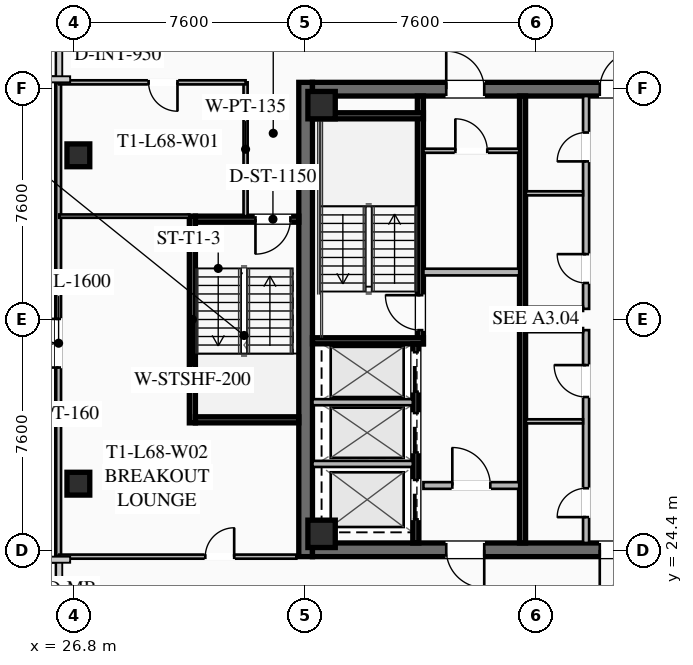
"""IFC4 building model, lengths in metres.
Left out: names, types, materials, properties, quantities, classifications, styles, units other than length and angle.
Written with IfcOpenShell. Run it as: python <this file> out.ifc"""

import sys

from ifc_helpers import new_model, si_unit, direction, frame, frame_2d, origin, origin_2d, place, context, subcontext, project, spatial, rectangle, hollow_rectangle, extrude, element, fill, save


model = new_model("IFC4")
c1 = context("Model", 3, precision=1e-05, world=origin(), true_north=direction((0.0, 1.0)))
c2 = subcontext(c1, "Body", "Model", "MODEL_VIEW")
j1 = project(units=[si_unit("LENGTHUNIT", "METRE"), si_unit("PLANEANGLEUNIT", "RADIAN")], contexts=[c1])
p1 = place(None, origin())
s1 = spatial("IfcSite", under=j1, at=p1, CompositionType="ELEMENT")
p2 = place(p1, origin())
s2 = spatial("IfcBuilding", under=s1, at=p2, CompositionType="ELEMENT")
p3 = place(p2, frame((0.0, 0.0, 251.4)))
s3 = spatial("IfcBuildingStorey", under=s2, at=p3, CompositionType="ELEMENT", Elevation=251.4)
p4 = place(p3, frame((34.425, 24.2, 0.0), z_axis=(0.0, 0.0, 1.0), x_axis=(0.0, 1.0, 0.0)))
e1 = element("IfcWall", 1, at=p4, inside=s3, PredefinedType="SHEAR", context=c2, shape_type="SweptSolid", body=[
    extrude(rectangle(XDim=15.6, YDim=0.45, at=frame_2d((7.8, 0.0))), origin(), (0.0, 0.0, 1.0), 4.0),
])
p5 = place(p3, frame((49.35, 24.425, 0.0), z_axis=(0.0, 0.0, 1.0), x_axis=(-1.0, 0.0, 0.0)))
e2 = element("IfcWall", 2, at=p5, inside=s3, PredefinedType="SHEAR", context=c2, shape_type="SweptSolid", body=[
    extrude(rectangle(XDim=14.7, YDim=0.45, at=frame_2d((7.35, 0.0))), origin(), (0.0, 0.0, 1.0), 4.0),
])
p6 = place(p5, frame((9.05, 0.0, 0.0)))
e3 = element("IfcOpeningElement", 3, at=p6, cuts=e2, PredefinedType="OPENING", context=c2, shape_type="SweptSolid", body=[
    extrude(rectangle(XDim=1.25, YDim=2.25, at=frame_2d((0.625, 1.125))), frame((0.0, 0.235, 0.0), z_axis=(0.0, -1.0, 0.0), x_axis=(1.0, 0.0, 0.0)), (0.0, 0.0, 1.0), 0.47),
])
p7 = place(p5, frame((4.0, 0.0, 0.0)))
e4 = element("IfcOpeningElement", 4, at=p7, cuts=e2, PredefinedType="OPENING", context=c2, shape_type="SweptSolid", body=[
    extrude(rectangle(XDim=1.25, YDim=2.25, at=frame_2d((0.625, 1.125))), frame((0.0, 0.235, 0.0), z_axis=(0.0, -1.0, 0.0), x_axis=(1.0, 0.0, 0.0)), (0.0, 0.0, 1.0), 0.47),
])
p8 = place(p3, frame((34.65, 39.575, 0.0), z_axis=(0.0, 0.0, 1.0), x_axis=(1.0, 0.0, 0.0)))
e5 = element("IfcWall", 5, at=p8, inside=s3, PredefinedType="SHEAR", context=c2, shape_type="SweptSolid", body=[
    extrude(rectangle(XDim=14.7, YDim=0.45, at=frame_2d((7.35, 0.0))), origin(), (0.0, 0.0, 1.0), 4.0),
])
p9 = place(p8, frame((4.4, 0.0, 0.0)))
e6 = element("IfcOpeningElement", 6, at=p9, cuts=e5, PredefinedType="OPENING", context=c2, shape_type="SweptSolid", body=[
    extrude(rectangle(XDim=1.25, YDim=2.25, at=frame_2d((0.625, 1.125))), frame((0.0, 0.235, 0.0), z_axis=(0.0, -1.0, 0.0), x_axis=(1.0, 0.0, 0.0)), (0.0, 0.0, 1.0), 0.47),
])
p10 = place(p8, frame((9.45, 0.0, 0.0)))
e7 = element("IfcOpeningElement", 7, at=p10, cuts=e5, PredefinedType="OPENING", context=c2, shape_type="SweptSolid", body=[
    extrude(rectangle(XDim=1.25, YDim=2.25, at=frame_2d((0.625, 1.125))), frame((0.0, 0.235, 0.0), z_axis=(0.0, -1.0, 0.0), x_axis=(1.0, 0.0, 0.0)), (0.0, 0.0, 1.0), 0.47),
])
for number, where, z_axis, x_axis in (
    (8, (34.95, 24.95, 0.0), (0.0, 0.0, 1.0), (1.0, 0.0, 0.0)),
    (9, (34.95, 39.05, 0.0), (0.0, 0.0, 1.0), (1.0, 0.0, 0.0)),
):
    element("IfcColumn", number, at=place(p3, frame(where, z_axis=z_axis, x_axis=x_axis)), inside=s3, PredefinedType="COLUMN", context=c2, shape_type="SweptSolid", body=[
        extrude(hollow_rectangle(XDim=0.9, YDim=0.9, WallThickness=0.04, at=origin_2d()), origin(), (0.0, 0.0, 1.0), 3.78),
    ])
for number, where, z_axis, x_axis in (
    (10, (26.95, 37.4, 0.0), (0.0, 0.0, 1.0), (1.0, 0.0, 0.0)),
    (11, (26.95, 26.6, 0.0), (0.0, 0.0, 1.0), (1.0, 0.0, 0.0)),
):
    element("IfcColumn", number, at=place(p3, frame(where, z_axis=z_axis, x_axis=x_axis)), inside=s3, PredefinedType="COLUMN", context=c2, shape_type="SweptSolid", body=[
        extrude(hollow_rectangle(XDim=0.75, YDim=0.75, WallThickness=0.032, at=origin_2d()), origin(), (0.0, 0.0, 1.0), 3.78),
    ])
p11 = place(p3, frame((26.3, 24.22, 0.0), z_axis=(0.0, 0.0, 1.0), x_axis=(0.0, 1.0, 0.0)))
e12 = element("IfcWall", 12, at=p11, inside=s3, PredefinedType="PARTITIONING", context=c2, shape_type="SweptSolid", body=[
    extrude(rectangle(XDim=15.56, YDim=0.16, at=frame_2d((7.78, 0.0))), origin(), (0.0, 0.0, 1.0), 2.971),
])
p12 = place(p11, frame((6.2, 0.0, 0.0)))
e13 = element("IfcOpeningElement", 13, at=p12, cuts=e12, PredefinedType="OPENING", context=c2, shape_type="SweptSolid", body=[
    extrude(rectangle(XDim=1.6, YDim=2.25, at=frame_2d((0.8, 1.125))), frame((0.0, 0.09, 0.0), z_axis=(0.0, -1.0, 0.0), x_axis=(1.0, 0.0, 0.0)), (0.0, 0.0, 1.0), 0.18),
])
p13 = place(p3, frame((38.2, 31.2, 0.0), z_axis=(0.0, 0.0, 1.0), x_axis=(0.0, 1.0, 0.0)))
e14 = element("IfcWall", 14, at=p13, inside=s3, PredefinedType="SHEAR", context=c2, shape_type="SweptSolid", body=[
    extrude(rectangle(XDim=8.15, YDim=0.2, at=frame_2d((4.075, 0.0))), origin(), (0.0, 0.0, 1.0), 3.78),
])
p14 = place(p13, frame((0.45, 0.0, 0.0)))
e15 = element("IfcOpeningElement", 15, at=p14, cuts=e14, PredefinedType="OPENING", context=c2, shape_type="SweptSolid", body=[
    extrude(rectangle(XDim=1.15, YDim=2.2, at=frame_2d((0.575, 1.1))), frame((0.0, 0.11, 0.0), z_axis=(0.0, -1.0, 0.0), x_axis=(1.0, 0.0, 0.0)), (0.0, 0.0, 1.0), 0.22),
])
for number, where, z_axis, x_axis in (
    (16, (34.65, 31.3, 0.0), (0.0, 0.0, 1.0), (1.0, 0.0, 0.0)),
    (17, (34.65, 38.7, 0.0), (0.0, 0.0, 1.0), (1.0, 0.0, 0.0)),
):
    element("IfcWall", number, at=place(p3, frame(where, z_axis=z_axis, x_axis=x_axis)), inside=s3, PredefinedType="SHEAR", context=c2, shape_type="SweptSolid", body=[
        extrude(rectangle(XDim=3.65, YDim=0.2, at=frame_2d((1.825, 0.0))), origin(), (0.0, 0.0, 1.0), 3.78),
    ])
p15 = place(p3, frame((41.56, 24.65, 0.0), z_axis=(0.0, 0.0, 1.0), x_axis=(0.0, 1.0, 0.0)))
e18 = element("IfcWall", 18, at=p15, inside=s3, PredefinedType="SHEAR", context=c2, shape_type="SweptSolid", body=[
    extrude(rectangle(XDim=14.7, YDim=0.2, at=frame_2d((7.35, 0.0))), origin(), (0.0, 0.0, 1.0), 3.78),
])
p16 = place(p3, frame((38.3, 33.56, 0.0), z_axis=(0.0, 0.0, 1.0), x_axis=(1.0, 0.0, 0.0)))
e19 = element("IfcWall", 19, at=p16, inside=s3, PredefinedType="SOLIDWALL", context=c2, shape_type="SweptSolid", body=[
    extrude(rectangle(XDim=3.15, YDim=0.22, at=frame_2d((1.575, 0.0))), origin(), (0.0, 0.0, 1.0), 2.971),
])
p17 = place(p3, frame((38.3, 26.54, 0.0), z_axis=(0.0, 0.0, 1.0), x_axis=(1.0, 0.0, 0.0)))
e20 = element("IfcWall", 20, at=p17, inside=s3, PredefinedType="SOLIDWALL", context=c2, shape_type="SweptSolid", body=[
    extrude(rectangle(XDim=3.15, YDim=0.22, at=frame_2d((1.575, 0.0))), origin(), (0.0, 0.0, 1.0), 2.971),
])
p18 = place(p17, frame((0.95, 0.0, 0.0)))
e21 = element("IfcOpeningElement", 21, at=p18, cuts=e20, PredefinedType="OPENING", context=c2, shape_type="SweptSolid", body=[
    extrude(rectangle(XDim=1.25, YDim=2.25, at=frame_2d((0.625, 1.125))), frame((0.0, 0.12, 0.0), z_axis=(0.0, -1.0, 0.0), x_axis=(1.0, 0.0, 0.0)), (0.0, 0.0, 1.0), 0.24),
])
p19 = place(p3, frame((38.05, 24.65, 0.0), z_axis=(0.0, 0.0, 1.0), x_axis=(0.0, 1.0, 0.0)))
e22 = element("IfcWall", 22, at=p19, inside=s3, PredefinedType="SHEAR", context=c2, shape_type="SweptSolid", body=[
    extrude(rectangle(XDim=6.55, YDim=0.2, at=frame_2d((3.275, 0.0))), origin(), (0.0, 0.0, 1.0), 3.78),
])
p20 = place(p19, frame((4.975, 0.0, 0.0)))
e23 = element("IfcOpeningElement", 23, at=p20, cuts=e22, PredefinedType="OPENING", context=c2, shape_type="SweptSolid", body=[
    extrude(rectangle(XDim=1.3, YDim=2.25, at=frame_2d((0.65, 1.125))), frame((0.0, 0.11, 0.0), z_axis=(0.0, -1.0, 0.0), x_axis=(1.0, 0.0, 0.0)), (0.0, 0.0, 1.0), 0.22),
])
p21 = place(p19, frame((2.975, 0.0, 0.0)))
e24 = element("IfcOpeningElement", 24, at=p21, cuts=e22, PredefinedType="OPENING", context=c2, shape_type="SweptSolid", body=[
    extrude(rectangle(XDim=1.3, YDim=2.25, at=frame_2d((0.65, 1.125))), frame((0.0, 0.11, 0.0), z_axis=(0.0, -1.0, 0.0), x_axis=(1.0, 0.0, 0.0)), (0.0, 0.0, 1.0), 0.22),
])
p22 = place(p19, frame((0.775, 0.0, 0.0)))
e25 = element("IfcOpeningElement", 25, at=p22, cuts=e22, PredefinedType="OPENING", context=c2, shape_type="SweptSolid", body=[
    extrude(rectangle(XDim=1.3, YDim=2.25, at=frame_2d((0.65, 1.125))), frame((0.0, 0.11, 0.0), z_axis=(0.0, -1.0, 0.0), x_axis=(1.0, 0.0, 0.0)), (0.0, 0.0, 1.0), 0.22),
])
for number, where, z_axis, x_axis in (
    (26, (34.65, 27.25, 0.0), (0.0, 0.0, 1.0), (1.0, 0.0, 0.0)),
    (27, (34.65, 29.28, 0.0), (0.0, 0.0, 1.0), (1.0, 0.0, 0.0)),
):
    element("IfcWall", number, at=place(p3, frame(where, z_axis=z_axis, x_axis=x_axis)), inside=s3, PredefinedType="SOLIDWALL", context=c2, shape_type="SweptSolid", body=[
        extrude(rectangle(XDim=3.3, YDim=0.2, at=frame_2d((1.65, 0.0))), origin(), (0.0, 0.0, 1.0), 3.78),
    ])
p23 = place(p3, frame((38.3, 37.55, 0.0), z_axis=(0.0, 0.0, 1.0), x_axis=(1.0, 0.0, 0.0)))
e28 = element("IfcWall", 28, at=p23, inside=s3, PredefinedType="PARTITIONING", context=c2, shape_type="SweptSolid", body=[
    extrude(rectangle(XDim=3.15, YDim=0.135, at=frame_2d((1.575, 0.0))), origin(), (0.0, 0.0, 1.0), 2.971),
])
p24 = place(p23, frame((1.05, 0.0, 0.0)))
e29 = element("IfcOpeningElement", 29, at=p24, cuts=e28, PredefinedType="OPENING", context=c2, shape_type="SweptSolid", body=[
    extrude(rectangle(XDim=1.05, YDim=2.2, at=frame_2d((0.525, 1.1))), frame((0.0, 0.077, 0.0), z_axis=(0.0, -1.0, 0.0), x_axis=(1.0, 0.0, 0.0)), (0.0, 0.0, 1.0), 0.155),
])
p25 = place(p3, frame((43.65, 24.65, 0.0), z_axis=(0.0, 0.0, 1.0), x_axis=(0.0, 1.0, 0.0)))
e30 = element("IfcWall", 30, at=p25, inside=s3, PredefinedType="SOLIDWALL", context=c2, shape_type="SweptSolid", body=[
    extrude(rectangle(XDim=7.0, YDim=0.2, at=frame_2d((3.5, 0.0))), origin(), (0.0, 0.0, 1.0), 2.971),
])
p26 = place(p25, frame((0.85, 0.0, 0.0)))
e31 = element("IfcOpeningElement", 31, at=p26, cuts=e30, PredefinedType="OPENING", context=c2, shape_type="SweptSolid", body=[
    extrude(rectangle(XDim=0.95, YDim=2.05, at=frame_2d((0.475, 1.025))), frame((0.0, 0.11, 0.0), z_axis=(0.0, -1.0, 0.0), x_axis=(1.0, 0.0, 0.0)), (0.0, 0.0, 1.0), 0.22),
])
p27 = place(p25, frame((4.8, 0.0, 0.0)))
e32 = element("IfcOpeningElement", 32, at=p27, cuts=e30, PredefinedType="OPENING", context=c2, shape_type="SweptSolid", body=[
    extrude(rectangle(XDim=1.05, YDim=2.2, at=frame_2d((0.525, 1.1))), frame((0.0, 0.11, 0.0), z_axis=(0.0, -1.0, 0.0), x_axis=(1.0, 0.0, 0.0)), (0.0, 0.0, 1.0), 0.22),
])
for number, where, z_axis, x_axis in (
    (33, (41.67, 31.65, 0.0), (0.0, 0.0, 1.0), (1.0, 0.0, 0.0)),
    (34, (41.67, 28.65, 0.0), (0.0, 0.0, 1.0), (1.0, 0.0, 0.0)),
):
    element("IfcWall", number, at=place(p3, frame(where, z_axis=z_axis, x_axis=x_axis)), inside=s3, PredefinedType="PARTITIONING", context=c2, shape_type="SweptSolid", body=[
        extrude(rectangle(XDim=1.88, YDim=0.135, at=frame_2d((0.94, 0.0))), origin(), (0.0, 0.0, 1.0), 2.971),
    ])
p28 = place(p3, frame((43.65, 32.35, 0.0), z_axis=(0.0, 0.0, 1.0), x_axis=(0.0, 1.0, 0.0)))
e35 = element("IfcWall", 35, at=p28, inside=s3, PredefinedType="SOLIDWALL", context=c2, shape_type="SweptSolid", body=[
    extrude(rectangle(XDim=7.0, YDim=0.2, at=frame_2d((3.5, 0.0))), origin(), (0.0, 0.0, 1.0), 2.971),
])
p29 = place(p28, frame((0.85, 0.0, 0.0)))
e36 = element("IfcOpeningElement", 36, at=p29, cuts=e35, PredefinedType="OPENING", context=c2, shape_type="SweptSolid", body=[
    extrude(rectangle(XDim=0.95, YDim=2.05, at=frame_2d((0.475, 1.025))), frame((0.0, 0.11, 0.0), z_axis=(0.0, -1.0, 0.0), x_axis=(1.0, 0.0, 0.0)), (0.0, 0.0, 1.0), 0.22),
])
p30 = place(p28, frame((4.85, 0.0, 0.0)))
e37 = element("IfcOpeningElement", 37, at=p30, cuts=e35, PredefinedType="OPENING", context=c2, shape_type="SweptSolid", body=[
    extrude(rectangle(XDim=0.95, YDim=2.05, at=frame_2d((0.475, 1.025))), frame((0.0, 0.11, 0.0), z_axis=(0.0, -1.0, 0.0), x_axis=(1.0, 0.0, 0.0)), (0.0, 0.0, 1.0), 0.22),
])
for number, where, z_axis, x_axis in (
    (38, (41.67, 32.35, 0.0), (0.0, 0.0, 1.0), (1.0, 0.0, 0.0)),
    (39, (41.67, 36.15, 0.0), (0.0, 0.0, 1.0), (1.0, 0.0, 0.0)),
):
    element("IfcWall", number, at=place(p3, frame(where, z_axis=z_axis, x_axis=x_axis)), inside=s3, PredefinedType="PARTITIONING", context=c2, shape_type="SweptSolid", body=[
        extrude(rectangle(XDim=1.88, YDim=0.135, at=frame_2d((0.94, 0.0))), origin(), (0.0, 0.0, 1.0), 2.971),
    ])
p31 = place(p3, frame((30.7, 28.6, 0.0), z_axis=(0.0, 0.0, 1.0), x_axis=(0.0, 1.0, 0.0)))
e40 = element("IfcWall", 40, at=p31, inside=s3, PredefinedType="SHEAR", context=c2, shape_type="SweptSolid", body=[
    extrude(rectangle(XDim=6.8, YDim=0.2, at=frame_2d((3.4, 0.0))), origin(), (0.0, 0.0, 1.0), 3.78),
])
p32 = place(p3, frame((34.2, 35.3, 0.0), z_axis=(0.0, 0.0, 1.0), x_axis=(-1.0, 0.0, 0.0)))
e41 = element("IfcWall", 41, at=p32, inside=s3, PredefinedType="SHEAR", context=c2, shape_type="SweptSolid", body=[
    extrude(rectangle(XDim=3.4, YDim=0.2, at=frame_2d((1.7, 0.0))), origin(), (0.0, 0.0, 1.0), 3.78),
])
p33 = place(p32, frame((0.275, 0.0, 0.0)))
e42 = element("IfcOpeningElement", 42, at=p33, cuts=e41, PredefinedType="OPENING", context=c2, shape_type="SweptSolid", body=[
    extrude(rectangle(XDim=1.15, YDim=2.2, at=frame_2d((0.575, 1.1))), frame((0.0, 0.11, 0.0), z_axis=(0.0, -1.0, 0.0), x_axis=(1.0, 0.0, 0.0)), (0.0, 0.0, 1.0), 0.22),
])
p34 = place(p3, frame((30.8, 28.7, 0.0), z_axis=(0.0, 0.0, 1.0), x_axis=(1.0, 0.0, 0.0)))
e43 = element("IfcWall", 43, at=p34, inside=s3, PredefinedType="SHEAR", context=c2, shape_type="SweptSolid", body=[
    extrude(rectangle(XDim=3.4, YDim=0.2, at=frame_2d((1.7, 0.0))), origin(), (0.0, 0.0, 1.0), 3.78),
])
p35 = place(p3, frame((32.45, 35.4, 0.0), z_axis=(0.0, 0.0, 1.0), x_axis=(0.0, 1.0, 0.0)))
e44 = element("IfcWall", 44, at=p35, inside=s3, PredefinedType="PARTITIONING", context=c2, shape_type="SweptSolid", body=[
    extrude(rectangle(XDim=4.4, YDim=0.135, at=frame_2d((2.2, 0.0))), origin(), (0.0, 0.0, 1.0), 2.971),
])
p36 = place(p3, frame((32.45, 39.8, 0.0), z_axis=(0.0, 0.0, 1.0), x_axis=(-1.0, 0.0, 0.0)))
e45 = element("IfcWall", 45, at=p36, inside=s3, PredefinedType="PARTITIONING", context=c2, shape_type="SweptSolid", body=[
    extrude(rectangle(XDim=6.13, YDim=0.135, at=frame_2d((3.065, 0.0))), origin(), (0.0, 0.0, 1.0), 2.971),
])
p37 = place(p36, frame((2.24, 0.0, 0.0)))
e46 = element("IfcOpeningElement", 46, at=p37, cuts=e45, PredefinedType="OPENING", context=c2, shape_type="SweptSolid", body=[
    extrude(rectangle(XDim=0.95, YDim=2.05, at=frame_2d((0.475, 1.025))), frame((0.0, 0.077, 0.0), z_axis=(0.0, -1.0, 0.0), x_axis=(1.0, 0.0, 0.0)), (0.0, 0.0, 1.0), 0.155),
])
p38 = place(p3, frame((26.32, 24.2, 0.0), z_axis=(0.0, 0.0, 1.0), x_axis=(1.0, 0.0, 0.0)))
e47 = element("IfcWall", 47, at=p38, inside=s3, PredefinedType="PARTITIONING", context=c2, shape_type="SweptSolid", body=[
    extrude(rectangle(XDim=7.8, YDim=0.135, at=frame_2d((3.9, 0.0))), origin(), (0.0, 0.0, 1.0), 2.971),
])
p39 = place(p38, frame((4.805, 0.0, 0.0)))
e48 = element("IfcOpeningElement", 48, at=p39, cuts=e47, PredefinedType="OPENING", context=c2, shape_type="SweptSolid", body=[
    extrude(rectangle(XDim=0.95, YDim=2.05, at=frame_2d((0.475, 1.025))), frame((0.0, 0.077, 0.0), z_axis=(0.0, -1.0, 0.0), x_axis=(1.0, 0.0, 0.0)), (0.0, 0.0, 1.0), 0.155),
])
p40 = place(p3, frame((30.6, 35.4, 0.0), z_axis=(0.0, 0.0, 1.0), x_axis=(-1.0, 0.0, 0.0)))
e49 = element("IfcWall", 49, at=p40, inside=s3, PredefinedType="PARTITIONING", context=c2, shape_type="SweptSolid", body=[
    extrude(rectangle(XDim=4.28, YDim=0.11, at=frame_2d((2.14, 0.0))), origin(), (0.0, 0.0, 1.0), 2.971),
])
p41 = place(p12, origin())
e50 = element("IfcDoor", 50, at=p41, inside=s3, OperationType="DOUBLE_DOOR_SINGLE_SWING", PredefinedType="DOOR", context=c2, shape_type="SweptSolid", body=[
    extrude(rectangle(XDim=1.6, YDim=2.25, at=frame_2d((0.8, 1.125))), frame((0.0, 0.025, 0.0), z_axis=(0.0, -1.0, 0.0), x_axis=(1.0, 0.0, 0.0)), (0.0, 0.0, 1.0), 0.05),
])
fill(e13, e50)
p42 = place(p9, origin())
e51 = element("IfcDoor", 51, at=p42, inside=s3, OperationType="SINGLE_SWING_LEFT", PredefinedType="DOOR", context=c2, shape_type="SweptSolid", body=[
    extrude(rectangle(XDim=1.25, YDim=2.25, at=frame_2d((0.625, 1.125))), frame((0.0, 0.025, 0.0), z_axis=(0.0, -1.0, 0.0), x_axis=(1.0, 0.0, 0.0)), (0.0, 0.0, 1.0), 0.05),
])
fill(e6, e51)
p43 = place(p10, origin())
e52 = element("IfcDoor", 52, at=p43, inside=s3, OperationType="SINGLE_SWING_RIGHT", PredefinedType="DOOR", context=c2, shape_type="SweptSolid", body=[
    extrude(rectangle(XDim=1.25, YDim=2.25, at=frame_2d((0.625, 1.125))), frame((0.0, 0.025, 0.0), z_axis=(0.0, -1.0, 0.0), x_axis=(1.0, 0.0, 0.0)), (0.0, 0.0, 1.0), 0.05),
])
fill(e7, e52)
p44 = place(p6, origin())
e53 = element("IfcDoor", 53, at=p44, inside=s3, OperationType="SINGLE_SWING_LEFT", PredefinedType="DOOR", context=c2, shape_type="SweptSolid", body=[
    extrude(rectangle(XDim=1.25, YDim=2.25, at=frame_2d((0.625, 1.125))), frame((0.0, 0.025, 0.0), z_axis=(0.0, -1.0, 0.0), x_axis=(1.0, 0.0, 0.0)), (0.0, 0.0, 1.0), 0.05),
])
fill(e3, e53)
p45 = place(p7, origin())
e54 = element("IfcDoor", 54, at=p45, inside=s3, OperationType="SINGLE_SWING_RIGHT", PredefinedType="DOOR", context=c2, shape_type="SweptSolid", body=[
    extrude(rectangle(XDim=1.25, YDim=2.25, at=frame_2d((0.625, 1.125))), frame((0.0, 0.025, 0.0), z_axis=(0.0, -1.0, 0.0), x_axis=(1.0, 0.0, 0.0)), (0.0, 0.0, 1.0), 0.05),
])
fill(e4, e54)
p46 = place(p14, origin())
e55 = element("IfcDoor", 55, at=p46, inside=s3, OperationType="SINGLE_SWING_RIGHT", PredefinedType="DOOR", context=c2, shape_type="SweptSolid", body=[
    extrude(rectangle(XDim=1.15, YDim=2.2, at=frame_2d((0.575, 1.1))), frame((0.0, 0.025, 0.0), z_axis=(0.0, -1.0, 0.0), x_axis=(1.0, 0.0, 0.0)), (0.0, 0.0, 1.0), 0.05),
])
fill(e15, e55)
p47 = place(p18, origin())
e56 = element("IfcDoor", 56, at=p47, inside=s3, OperationType="SINGLE_SWING_LEFT", PredefinedType="DOOR", context=c2, shape_type="SweptSolid", body=[
    extrude(rectangle(XDim=1.25, YDim=2.25, at=frame_2d((0.625, 1.125))), frame((0.0, 0.025, 0.0), z_axis=(0.0, -1.0, 0.0), x_axis=(1.0, 0.0, 0.0)), (0.0, 0.0, 1.0), 0.05),
])
fill(e21, e56)
p48 = place(p24, origin())
e57 = element("IfcDoor", 57, at=p48, inside=s3, OperationType="SINGLE_SWING_LEFT", PredefinedType="DOOR", context=c2, shape_type="SweptSolid", body=[
    extrude(rectangle(XDim=1.05, YDim=2.2, at=frame_2d((0.525, 1.1))), frame((0.0, 0.025, 0.0), z_axis=(0.0, -1.0, 0.0), x_axis=(1.0, 0.0, 0.0)), (0.0, 0.0, 1.0), 0.05),
])
fill(e29, e57)
p49 = place(p26, origin())
e58 = element("IfcDoor", 58, at=p49, inside=s3, OperationType="SINGLE_SWING_LEFT", PredefinedType="DOOR", context=c2, shape_type="SweptSolid", body=[
    extrude(rectangle(XDim=0.95, YDim=2.05, at=frame_2d((0.475, 1.025))), frame((0.0, 0.025, 0.0), z_axis=(0.0, -1.0, 0.0), x_axis=(1.0, 0.0, 0.0)), (0.0, 0.0, 1.0), 0.05),
])
fill(e31, e58)
p50 = place(p27, origin())
e59 = element("IfcDoor", 59, at=p50, inside=s3, OperationType="SINGLE_SWING_RIGHT", PredefinedType="DOOR", context=c2, shape_type="SweptSolid", body=[
    extrude(rectangle(XDim=1.05, YDim=2.2, at=frame_2d((0.525, 1.1))), frame((0.0, 0.025, 0.0), z_axis=(0.0, -1.0, 0.0), x_axis=(1.0, 0.0, 0.0)), (0.0, 0.0, 1.0), 0.05),
])
fill(e32, e59)
p51 = place(p29, origin())
e60 = element("IfcDoor", 60, at=p51, inside=s3, OperationType="SINGLE_SWING_RIGHT", PredefinedType="DOOR", context=c2, shape_type="SweptSolid", body=[
    extrude(rectangle(XDim=0.95, YDim=2.05, at=frame_2d((0.475, 1.025))), frame((0.0, 0.025, 0.0), z_axis=(0.0, -1.0, 0.0), x_axis=(1.0, 0.0, 0.0)), (0.0, 0.0, 1.0), 0.05),
])
fill(e36, e60)
p52 = place(p30, origin())
e61 = element("IfcDoor", 61, at=p52, inside=s3, OperationType="SINGLE_SWING_LEFT", PredefinedType="DOOR", context=c2, shape_type="SweptSolid", body=[
    extrude(rectangle(XDim=0.95, YDim=2.05, at=frame_2d((0.475, 1.025))), frame((0.0, 0.025, 0.0), z_axis=(0.0, -1.0, 0.0), x_axis=(1.0, 0.0, 0.0)), (0.0, 0.0, 1.0), 0.05),
])
fill(e37, e61)
p53 = place(p33, origin())
e62 = element("IfcDoor", 62, at=p53, inside=s3, OperationType="SINGLE_SWING_RIGHT", PredefinedType="DOOR", context=c2, shape_type="SweptSolid", body=[
    extrude(rectangle(XDim=1.15, YDim=2.2, at=frame_2d((0.575, 1.1))), frame((0.0, 0.025, 0.0), z_axis=(0.0, -1.0, 0.0), x_axis=(1.0, 0.0, 0.0)), (0.0, 0.0, 1.0), 0.05),
])
fill(e42, e62)
p54 = place(p37, origin())
e63 = element("IfcDoor", 63, at=p54, inside=s3, OperationType="SINGLE_SWING_LEFT", PredefinedType="DOOR", context=c2, shape_type="SweptSolid", body=[
    extrude(rectangle(XDim=0.95, YDim=2.05, at=frame_2d((0.475, 1.025))), frame((0.0, 0.025, 0.0), z_axis=(0.0, -1.0, 0.0), x_axis=(1.0, 0.0, 0.0)), (0.0, 0.0, 1.0), 0.05),
])
fill(e46, e63)
p55 = place(p39, origin())
e64 = element("IfcDoor", 64, at=p55, inside=s3, OperationType="SINGLE_SWING_RIGHT", PredefinedType="DOOR", context=c2, shape_type="SweptSolid", body=[
    extrude(rectangle(XDim=0.95, YDim=2.05, at=frame_2d((0.475, 1.025))), frame((0.0, 0.025, 0.0), z_axis=(0.0, -1.0, 0.0), x_axis=(1.0, 0.0, 0.0)), (0.0, 0.0, 1.0), 0.05),
])
fill(e48, e64)
p56 = place(p20, origin())
e65 = element("IfcDoor", 65, at=p56, inside=s3, OperationType="SLIDING_TO_LEFT", PredefinedType="DOOR", context=c2, shape_type="SweptSolid", body=[
    extrude(rectangle(XDim=1.3, YDim=2.25, at=frame_2d((0.65, 1.125))), frame((0.0, 0.025, 0.0), z_axis=(0.0, -1.0, 0.0), x_axis=(1.0, 0.0, 0.0)), (0.0, 0.0, 1.0), 0.05),
])
fill(e23, e65)
p57 = place(p21, origin())
e66 = element("IfcDoor", 66, at=p57, inside=s3, OperationType="SLIDING_TO_LEFT", PredefinedType="DOOR", context=c2, shape_type="SweptSolid", body=[
    extrude(rectangle(XDim=1.3, YDim=2.25, at=frame_2d((0.65, 1.125))), frame((0.0, 0.025, 0.0), z_axis=(0.0, -1.0, 0.0), x_axis=(1.0, 0.0, 0.0)), (0.0, 0.0, 1.0), 0.05),
])
fill(e24, e66)
p58 = place(p22, origin())
e67 = element("IfcDoor", 67, at=p58, inside=s3, OperationType="SLIDING_TO_LEFT", PredefinedType="DOOR", context=c2, shape_type="SweptSolid", body=[
    extrude(rectangle(XDim=1.3, YDim=2.25, at=frame_2d((0.65, 1.125))), frame((0.0, 0.025, 0.0), z_axis=(0.0, -1.0, 0.0), x_axis=(1.0, 0.0, 0.0)), (0.0, 0.0, 1.0), 0.05),
])
fill(e25, e67)
save(model, sys.argv[1])
